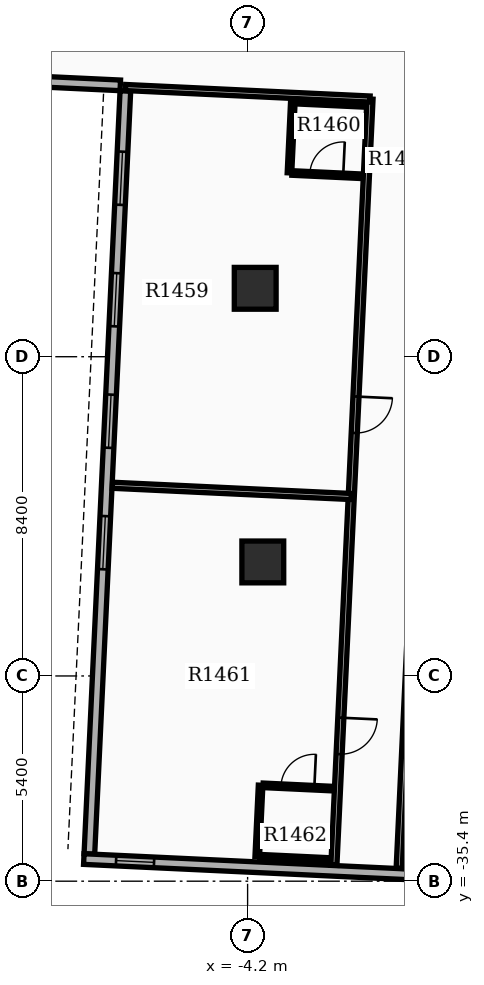
"""IFC4 building model, lengths in metres.
Left out: names, types, materials, properties, quantities, classifications, styles, units other than length and angle.
Written with IfcOpenShell. Run it as: python <this file> out.ifc"""

import sys

from ifc_helpers import new_model, si_unit, direction, frame, frame_2d, origin, origin_2d, place, context, subcontext, project, spatial, rectangle, extrude, element, fill, save


model = new_model("IFC4")
c1 = context("Model", 3, precision=1e-05, world=origin(), true_north=direction((0.0, 1.0)))
c2 = subcontext(c1, "Body", "Model", "MODEL_VIEW")
j1 = project(units=[si_unit("LENGTHUNIT", "METRE"), si_unit("PLANEANGLEUNIT", "RADIAN")], contexts=[c1])
p1 = place(None, origin())
s1 = spatial("IfcSite", under=j1, at=p1, CompositionType="ELEMENT")
p2 = place(p1, origin())
s2 = spatial("IfcBuilding", under=s1, at=p2, CompositionType="ELEMENT")
p3 = place(p2, frame((0.0, 0.0, 91.2)))
s3 = spatial("IfcBuildingStorey", under=s2, at=p3, CompositionType="ELEMENT", Elevation=91.2)
for number, where, z_axis, x_axis in (
    (1, (-4.0, -19.8, 0.0), (0.0, 0.0, 1.0), (1.0, 0.0, 0.0)),
    (2, (-3.8, -27.0, 0.0), (0.0, 0.0, 1.0), (1.0, 0.0, 0.0)),
):
    element("IfcColumn", number, at=place(p3, frame(where, z_axis=z_axis, x_axis=x_axis)), inside=s3, PredefinedType="COLUMN", context=c2, shape_type="SweptSolid", body=[
        extrude(rectangle(XDim=1.1, YDim=1.1, at=origin_2d()), origin(), (0.0, 0.0, 1.0), 3.9),
    ])
p4 = place(p3, frame((-7.416, -14.607, 0.0), z_axis=(0.0, 0.0, 1.0), x_axis=(-0.047103473814, -0.998890015344, 0.0)))
e3 = element("IfcWall", 3, at=p4, inside=s3, PredefinedType="STANDARD", context=c2, shape_type="SweptSolid", body=[
    extrude(rectangle(XDim=20.1, YDim=0.28, at=frame_2d((10.05, 0.0))), origin(), (0.0, 0.0, 1.0), 2.86),
])
p5 = place(p4, frame((1.6, 0.0, 0.8)))
e4 = element("IfcOpeningElement", 4, at=p5, cuts=e3, PredefinedType="OPENING", context=c2, shape_type="SweptSolid", body=[
    extrude(rectangle(XDim=1.4, YDim=1.6, at=frame_2d((0.7, 0.8))), frame((0.0, 0.15, 0.0), z_axis=(0.0, -1.0, 0.0), x_axis=(1.0, 0.0, 0.0)), (0.0, 0.0, 1.0), 0.3),
])
p6 = place(p4, frame((4.8, 0.0, 0.8)))
e5 = element("IfcOpeningElement", 5, at=p6, cuts=e3, PredefinedType="OPENING", context=c2, shape_type="SweptSolid", body=[
    extrude(rectangle(XDim=1.4, YDim=1.6, at=frame_2d((0.7, 0.8))), frame((0.0, 0.15, 0.0), z_axis=(0.0, -1.0, 0.0), x_axis=(1.0, 0.0, 0.0)), (0.0, 0.0, 1.0), 0.3),
])
p7 = place(p4, frame((8.0, 0.0, 0.8)))
e6 = element("IfcOpeningElement", 6, at=p7, cuts=e3, PredefinedType="OPENING", context=c2, shape_type="SweptSolid", body=[
    extrude(rectangle(XDim=1.4, YDim=1.6, at=frame_2d((0.7, 0.8))), frame((0.0, 0.15, 0.0), z_axis=(0.0, -1.0, 0.0), x_axis=(1.0, 0.0, 0.0)), (0.0, 0.0, 1.0), 0.3),
])
p8 = place(p4, frame((11.2, 0.0, 0.8)))
e7 = element("IfcOpeningElement", 7, at=p8, cuts=e3, PredefinedType="OPENING", context=c2, shape_type="SweptSolid", body=[
    extrude(rectangle(XDim=1.4, YDim=1.6, at=frame_2d((0.7, 0.8))), frame((0.0, 0.15, 0.0), z_axis=(0.0, -1.0, 0.0), x_axis=(1.0, 0.0, 0.0)), (0.0, 0.0, 1.0), 0.3),
])
p9 = place(p3, frame((-8.51, -34.818, 0.0), z_axis=(0.0, 0.0, 1.0), x_axis=(0.998890092147, -0.047101845086, 0.0)))
e8 = element("IfcWall", 8, at=p9, inside=s3, PredefinedType="STANDARD", context=c2, shape_type="SweptSolid", body=[
    extrude(rectangle(XDim=13.72, YDim=0.28, at=frame_2d((6.86, 0.0))), origin(), (0.0, 0.0, 1.0), 2.86),
])
p10 = place(p9, frame((0.85, 0.0, 0.85)))
e9 = element("IfcOpeningElement", 9, at=p10, cuts=e8, PredefinedType="OPENING", context=c2, shape_type="SweptSolid", body=[
    extrude(rectangle(XDim=1.0, YDim=1.5, at=frame_2d((0.5, 0.75))), frame((0.0, 0.15, 0.0), z_axis=(0.0, -1.0, 0.0), x_axis=(1.0, 0.0, 0.0)), (0.0, 0.0, 1.0), 0.3),
])
p11 = place(p3, frame((-13.843, -14.164, 0.0), z_axis=(0.0, 0.0, 1.0), x_axis=(0.998889082162, -0.047123258997, 0.0)))
e10 = element("IfcWall", 10, at=p11, inside=s3, PredefinedType="STANDARD", context=c2, shape_type="SweptSolid", body=[
    extrude(rectangle(XDim=6.3, YDim=0.28, at=frame_2d((3.15, 0.0))), origin(), (0.0, 0.0, 1.0), 2.86),
])
p12 = place(p3, frame((0.739, -14.901, 0.0), z_axis=(0.0, 0.0, 1.0), x_axis=(-0.047117991871, -0.998889330628, 0.0)))
e11 = element("IfcWall", 11, at=p12, inside=s3, PredefinedType="PARTITIONING", context=c2, shape_type="SweptSolid", body=[
    extrude(rectangle(XDim=20.182, YDim=0.16, at=frame_2d((10.091, 0.0))), origin(), (0.0, 0.0, 1.0), 2.85),
])
p13 = place(p12, frame((7.836, 0.0, 0.0)))
e12 = element("IfcOpeningElement", 12, at=p13, cuts=e11, PredefinedType="OPENING", context=c2, shape_type="SweptSolid", body=[
    extrude(rectangle(XDim=0.96, YDim=2.15, at=frame_2d((0.48, 1.075))), frame((0.0, 0.09, 0.0), z_axis=(0.0, -1.0, 0.0), x_axis=(1.0, 0.0, 0.0)), (0.0, 0.0, 1.0), 0.18),
])
p14 = place(p12, frame((16.296, 0.0, 0.0)))
e13 = element("IfcOpeningElement", 13, at=p14, cuts=e11, PredefinedType="OPENING", context=c2, shape_type="SweptSolid", body=[
    extrude(rectangle(XDim=0.96, YDim=2.15, at=frame_2d((0.48, 1.075))), frame((0.0, 0.09, 0.0), z_axis=(0.0, -1.0, 0.0), x_axis=(1.0, 0.0, 0.0)), (0.0, 0.0, 1.0), 0.18),
])
p15 = place(p3, frame((-0.066, -34.936, 0.0), z_axis=(0.0, 0.0, 1.0), x_axis=(0.998891083954, -0.047080807099, 0.0)))
e14 = element("IfcWall", 14, at=p15, inside=s3, PredefinedType="PARTITIONING", context=c2, shape_type="SweptSolid", body=[
    extrude(rectangle(XDim=1.82, YDim=0.12, at=frame_2d((0.91, 0.0))), origin(), (0.0, 0.0, 1.0), 2.85),
])
p16 = place(p3, frame((-0.979, -14.82, 0.0), z_axis=(0.0, 0.0, 1.0), x_axis=(-0.047105352469, -0.998889926753, 0.0)))
e15 = element("IfcWall", 15, at=p16, inside=s3, PredefinedType="PARTITIONING", context=c2, shape_type="SweptSolid", body=[
    extrude(rectangle(XDim=20.182, YDim=0.16, at=frame_2d((10.091, 0.0))), origin(), (0.0, 0.0, 1.0), 2.85),
])
p17 = place(p16, frame((7.836, 0.0, 0.0)))
e16 = element("IfcOpeningElement", 16, at=p17, cuts=e15, PredefinedType="OPENING", context=c2, shape_type="SweptSolid", body=[
    extrude(rectangle(XDim=0.96, YDim=2.15, at=frame_2d((0.48, 1.075))), frame((0.0, 0.09, 0.0), z_axis=(0.0, -1.0, 0.0), x_axis=(1.0, 0.0, 0.0)), (0.0, 0.0, 1.0), 0.18),
])
p18 = place(p16, frame((16.296, 0.0, 0.0)))
e17 = element("IfcOpeningElement", 17, at=p18, cuts=e15, PredefinedType="OPENING", context=c2, shape_type="SweptSolid", body=[
    extrude(rectangle(XDim=0.96, YDim=2.15, at=frame_2d((0.48, 1.075))), frame((0.0, 0.09, 0.0), z_axis=(0.0, -1.0, 0.0), x_axis=(1.0, 0.0, 0.0)), (0.0, 0.0, 1.0), 0.18),
])
p19 = place(p3, frame((-0.979, -14.82, 0.0), z_axis=(0.0, 0.0, 1.0), x_axis=(-0.998890922349, 0.047084235666, 0.0)))
e18 = element("IfcWall", 18, at=p19, inside=s3, PredefinedType="PARTITIONING", context=c2, shape_type="SweptSolid", body=[
    extrude(rectangle(XDim=6.44, YDim=0.16, at=frame_2d((3.22, 0.0))), origin(), (0.0, 0.0, 1.0), 2.85),
])
p20 = place(p3, frame((-1.472, -25.279, 0.0), z_axis=(0.0, 0.0, 1.0), x_axis=(-0.998889891508, 0.047106099844, 0.0)))
e19 = element("IfcWall", 19, at=p20, inside=s3, PredefinedType="PARTITIONING", context=c2, shape_type="SweptSolid", body=[
    extrude(rectangle(XDim=6.292, YDim=0.16, at=frame_2d((3.146, 0.0))), origin(), (0.0, 0.0, 1.0), 2.85),
])
p21 = place(p3, frame((-3.033, -16.766, 0.0), z_axis=(0.0, 0.0, 1.0), x_axis=(0.998884766924, -0.047214641863, 0.0)))
e20 = element("IfcWall", 20, at=p21, inside=s3, PredefinedType="PARTITIONING", context=c2, shape_type="SweptSolid", body=[
    extrude(rectangle(XDim=1.82, YDim=0.12, at=frame_2d((0.91, 0.0))), origin(), (0.0, 0.0, 1.0), 2.85),
])
p22 = place(p21, frame((0.47, 0.0, 0.0)))
e21 = element("IfcOpeningElement", 21, at=p22, cuts=e20, PredefinedType="OPENING", context=c2, shape_type="SweptSolid", body=[
    extrude(rectangle(XDim=0.88, YDim=2.1, at=frame_2d((0.44, 1.05))), frame((0.0, 0.07, 0.0), z_axis=(0.0, -1.0, 0.0), x_axis=(1.0, 0.0, 0.0)), (0.0, 0.0, 1.0), 0.14),
])
p23 = place(p3, frame((-2.945, -14.888, 0.0), z_axis=(0.0, 0.0, 1.0), x_axis=(0.998884467853, -0.047220968666, 0.0)))
e22 = element("IfcWall", 22, at=p23, inside=s3, PredefinedType="PARTITIONING", context=c2, shape_type="SweptSolid", body=[
    extrude(rectangle(XDim=1.82, YDim=0.12, at=frame_2d((0.91, 0.0))), origin(), (0.0, 0.0, 1.0), 2.85),
])
p24 = place(p3, frame((-3.01, -14.885, 0.0), z_axis=(0.0, 0.0, 1.0), x_axis=(-0.047139425368, -0.998888319371, 0.0)))
e23 = element("IfcWall", 23, at=p24, inside=s3, PredefinedType="PARTITIONING", context=c2, shape_type="SweptSolid", body=[
    extrude(rectangle(XDim=1.88, YDim=0.12, at=frame_2d((0.94, 0.0))), origin(), (0.0, 0.0, 1.0), 2.85),
])
p25 = place(p3, frame((-3.793, -32.878, 0.0), z_axis=(0.0, 0.0, 1.0), x_axis=(0.998884467853, -0.047220968666, 0.0)))
e24 = element("IfcWall", 24, at=p25, inside=s3, PredefinedType="PARTITIONING", context=c2, shape_type="SweptSolid", body=[
    extrude(rectangle(XDim=1.82, YDim=0.12, at=frame_2d((0.91, 0.0))), origin(), (0.0, 0.0, 1.0), 2.85),
])
p26 = place(p25, frame((0.47, 0.0, 0.0)))
e25 = element("IfcOpeningElement", 25, at=p26, cuts=e24, PredefinedType="OPENING", context=c2, shape_type="SweptSolid", body=[
    extrude(rectangle(XDim=0.88, YDim=2.1, at=frame_2d((0.44, 1.05))), frame((0.0, 0.07, 0.0), z_axis=(0.0, -1.0, 0.0), x_axis=(1.0, 0.0, 0.0)), (0.0, 0.0, 1.0), 0.14),
])
p27 = place(p3, frame((-3.882, -34.756, 0.0), z_axis=(0.0, 0.0, 1.0), x_axis=(0.998884766924, -0.047214641863, 0.0)))
e26 = element("IfcWall", 26, at=p27, inside=s3, PredefinedType="PARTITIONING", context=c2, shape_type="SweptSolid", body=[
    extrude(rectangle(XDim=1.82, YDim=0.12, at=frame_2d((0.91, 0.0))), origin(), (0.0, 0.0, 1.0), 2.85),
])
p28 = place(p3, frame((-3.858, -32.875, 0.0), z_axis=(0.0, 0.0, 1.0), x_axis=(-0.047139425368, -0.998888319371, 0.0)))
e27 = element("IfcWall", 27, at=p28, inside=s3, PredefinedType="PARTITIONING", context=c2, shape_type="SweptSolid", body=[
    extrude(rectangle(XDim=1.88, YDim=0.12, at=frame_2d((0.94, 0.0))), origin(), (0.0, 0.0, 1.0), 2.85),
])
p29 = place(p5, origin())
e28 = element("IfcWindow", 28, at=p29, inside=s3, PartitioningType="SINGLE_PANEL", PredefinedType="WINDOW", context=c2, shape_type="SweptSolid", body=[
    extrude(rectangle(XDim=1.4, YDim=1.6, at=frame_2d((0.7, 0.8))), frame((0.0, 0.03, 0.0), z_axis=(0.0, -1.0, 0.0), x_axis=(1.0, 0.0, 0.0)), (0.0, 0.0, 1.0), 0.06),
])
fill(e4, e28)
p30 = place(p6, origin())
e29 = element("IfcWindow", 29, at=p30, inside=s3, PartitioningType="SINGLE_PANEL", PredefinedType="WINDOW", context=c2, shape_type="SweptSolid", body=[
    extrude(rectangle(XDim=1.4, YDim=1.6, at=frame_2d((0.7, 0.8))), frame((0.0, 0.03, 0.0), z_axis=(0.0, -1.0, 0.0), x_axis=(1.0, 0.0, 0.0)), (0.0, 0.0, 1.0), 0.06),
])
fill(e5, e29)
p31 = place(p7, origin())
e30 = element("IfcWindow", 30, at=p31, inside=s3, PartitioningType="SINGLE_PANEL", PredefinedType="WINDOW", context=c2, shape_type="SweptSolid", body=[
    extrude(rectangle(XDim=1.4, YDim=1.6, at=frame_2d((0.7, 0.8))), frame((0.0, 0.03, 0.0), z_axis=(0.0, -1.0, 0.0), x_axis=(1.0, 0.0, 0.0)), (0.0, 0.0, 1.0), 0.06),
])
fill(e6, e30)
p32 = place(p8, origin())
e31 = element("IfcWindow", 31, at=p32, inside=s3, PartitioningType="SINGLE_PANEL", PredefinedType="WINDOW", context=c2, shape_type="SweptSolid", body=[
    extrude(rectangle(XDim=1.4, YDim=1.6, at=frame_2d((0.7, 0.8))), frame((0.0, 0.03, 0.0), z_axis=(0.0, -1.0, 0.0), x_axis=(1.0, 0.0, 0.0)), (0.0, 0.0, 1.0), 0.06),
])
fill(e7, e31)
p33 = place(p10, origin())
e32 = element("IfcWindow", 32, at=p33, inside=s3, PartitioningType="SINGLE_PANEL", PredefinedType="WINDOW", context=c2, shape_type="SweptSolid", body=[
    extrude(rectangle(XDim=1.0, YDim=1.5, at=frame_2d((0.5, 0.75))), frame((0.0, 0.03, 0.0), z_axis=(0.0, -1.0, 0.0), x_axis=(1.0, 0.0, 0.0)), (0.0, 0.0, 1.0), 0.06),
])
fill(e9, e32)
p34 = place(p14, origin())
e33 = element("IfcDoor", 33, at=p34, inside=s3, OperationType="SINGLE_SWING_LEFT", PredefinedType="DOOR", context=c2, shape_type="SweptSolid", body=[
    extrude(rectangle(XDim=0.96, YDim=2.15, at=frame_2d((0.48, 1.075))), frame((0.0, 0.025, 0.0), z_axis=(0.0, -1.0, 0.0), x_axis=(1.0, 0.0, 0.0)), (0.0, 0.0, 1.0), 0.05),
])
fill(e13, e33)
p35 = place(p17, origin())
e34 = element("IfcDoor", 34, at=p35, inside=s3, OperationType="SINGLE_SWING_LEFT", PredefinedType="DOOR", context=c2, shape_type="SweptSolid", body=[
    extrude(rectangle(XDim=0.96, YDim=2.15, at=frame_2d((0.48, 1.075))), frame((0.0, 0.025, 0.0), z_axis=(0.0, -1.0, 0.0), x_axis=(1.0, 0.0, 0.0)), (0.0, 0.0, 1.0), 0.05),
])
fill(e16, e34)
p36 = place(p22, origin())
e35 = element("IfcDoor", 35, at=p36, inside=s3, OperationType="SINGLE_SWING_RIGHT", PredefinedType="DOOR", context=c2, shape_type="SweptSolid", body=[
    extrude(rectangle(XDim=0.88, YDim=2.1, at=frame_2d((0.44, 1.05))), frame((0.0, 0.025, 0.0), z_axis=(0.0, -1.0, 0.0), x_axis=(1.0, 0.0, 0.0)), (0.0, 0.0, 1.0), 0.05),
])
fill(e21, e35)
p37 = place(p18, origin())
e36 = element("IfcDoor", 36, at=p37, inside=s3, OperationType="SINGLE_SWING_LEFT", PredefinedType="DOOR", context=c2, shape_type="SweptSolid", body=[
    extrude(rectangle(XDim=0.96, YDim=2.15, at=frame_2d((0.48, 1.075))), frame((0.0, 0.025, 0.0), z_axis=(0.0, -1.0, 0.0), x_axis=(1.0, 0.0, 0.0)), (0.0, 0.0, 1.0), 0.05),
])
fill(e17, e36)
p38 = place(p26, origin())
e37 = element("IfcDoor", 37, at=p38, inside=s3, OperationType="SINGLE_SWING_RIGHT", PredefinedType="DOOR", context=c2, shape_type="SweptSolid", body=[
    extrude(rectangle(XDim=0.88, YDim=2.1, at=frame_2d((0.44, 1.05))), frame((0.0, 0.025, 0.0), z_axis=(0.0, -1.0, 0.0), x_axis=(1.0, 0.0, 0.0)), (0.0, 0.0, 1.0), 0.05),
])
fill(e25, e37)
save(model, sys.argv[1])
